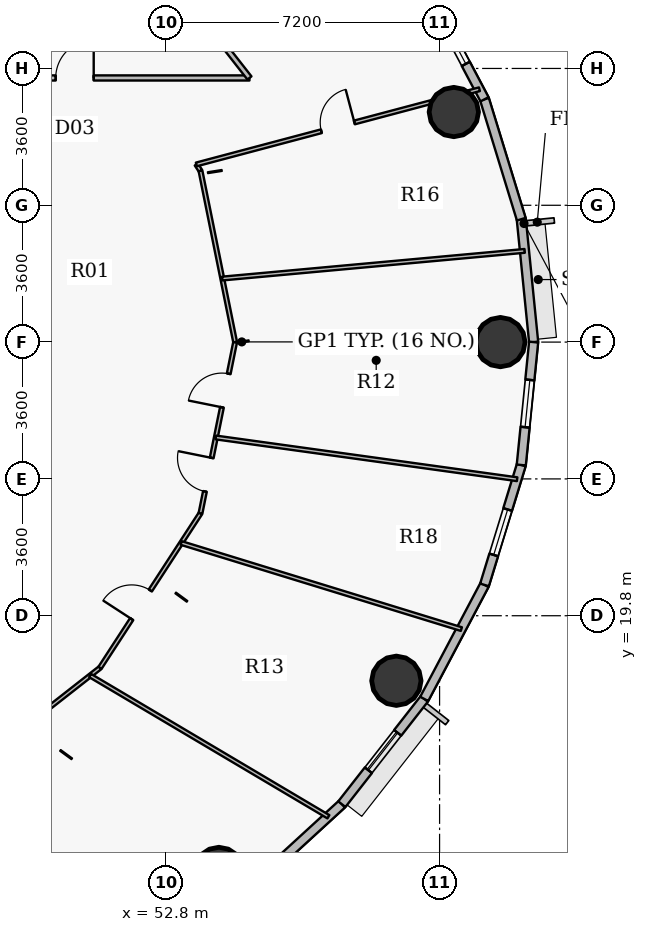
"""IFC4 building model, lengths in metres.
Left out: names, types, materials, properties, quantities, classifications, styles, units other than length and angle.
Written with IfcOpenShell. Run it as: python <this file> out.ifc"""

import sys

from ifc_helpers import new_model, si_unit, direction, frame, frame_2d, origin, origin_2d, place, context, subcontext, project, spatial, rectangle, hollow_circle, extrude, source, transform, mapped, element, fill, save


model = new_model("IFC4")
c1 = context("Model", 3, precision=1e-05, world=origin(), true_north=direction((0.0, 1.0)))
c2 = subcontext(c1, "Body", "Model", "MODEL_VIEW")
j1 = project(units=[si_unit("LENGTHUNIT", "METRE"), si_unit("PLANEANGLEUNIT", "RADIAN")], contexts=[c1])
p1 = place(None, origin())
s1 = spatial("IfcSite", under=j1, at=p1, CompositionType="ELEMENT")
p2 = place(p1, origin())
s2 = spatial("IfcBuilding", under=s1, at=p2, CompositionType="ELEMENT")
p3 = place(p2, frame((0.0, 0.0, 189.9)))
s3 = spatial("IfcBuildingStorey", under=s2, at=p3, CompositionType="ELEMENT", Elevation=189.9)
for number, where, z_axis, x_axis in (
    (1, (61.6, 27.0, 0.0), (0.0, 0.0, 1.0), (1.0, 0.0, 0.0)),
    (2, (60.375, 33.053, 0.0), (0.0, 0.0, 1.0), (1.0, 0.0, 0.0)),
    (3, (54.192, 13.058, 0.0), (0.0, 0.0, 1.0), (1.0, 0.0, 0.0)),
    (4, (58.863, 18.089, 0.0), (0.0, 0.0, 1.0), (1.0, 0.0, 0.0)),
):
    element("IfcColumn", number, at=place(p3, frame(where, z_axis=z_axis, x_axis=x_axis)), inside=s3, PredefinedType="COLUMN", context=c2, shape_type="SweptSolid", body=[
        extrude(hollow_circle(Radius=0.65, WallThickness=0.04, at=origin_2d()), origin(), (0.0, 0.0, 1.0), 3.75),
    ])
p4 = place(p3, frame((62.15, 30.234, 0.0), z_axis=(0.0, 0.0, 1.0), x_axis=(0.100061534614, -0.994981250723, 0.0)))
e5 = element("IfcWall", 5, at=p4, inside=s3, PredefinedType="SOLIDWALL", context=c2, shape_type="SweptSolid", body=[
    extrude(rectangle(XDim=3.25, YDim=0.24, at=frame_2d((1.625, 0.0))), origin(), (0.0, 0.0, 1.0), 3.5),
])
p5 = place(p3, frame((61.183, 33.389, 0.0), z_axis=(0.0, 0.0, 1.0), x_axis=(0.293097995113, -0.956082405058, 0.0)))
e6 = element("IfcWall", 6, at=p5, inside=s3, PredefinedType="SOLIDWALL", context=c2, shape_type="SweptSolid", body=[
    extrude(rectangle(XDim=3.3, YDim=0.24, at=frame_2d((1.65, 0.0))), origin(), (0.0, 0.0, 1.0), 3.5),
])
p6 = place(p3, frame((59.596, 36.388, 0.0), z_axis=(0.0, 0.0, 1.0), x_axis=(0.467586874938, -0.88394712194, 0.0)))
e7 = element("IfcWall", 7, at=p6, inside=s3, PredefinedType="SOLIDWALL", context=c2, shape_type="SweptSolid", body=[
    extrude(rectangle(XDim=3.393, YDim=0.24, at=frame_2d((1.697, 0.0))), origin(), (0.0, 0.0, 1.0), 3.5),
])
p7 = place(p6, frame((0.739, 0.0, 0.9)))
e8 = element("IfcOpeningElement", 8, at=p7, cuts=e7, PredefinedType="OPENING", context=c2, shape_type="SweptSolid", body=[
    extrude(rectangle(XDim=1.6, YDim=1.75, at=origin_2d()), frame((0.8, 0.13, 0.875), z_axis=(0.0, -1.0, 0.0), x_axis=(1.0, 0.0, 0.0)), (0.0, 0.0, 1.0), 0.26),
])
p8 = place(p3, frame((57.428, 14.842, 0.0), z_axis=(0.0, 0.0, 1.0), x_axis=(-0.737076565834, -0.675809245349, 0.0)))
e9 = element("IfcWall", 9, at=p8, inside=s3, PredefinedType="SOLIDWALL", context=c2, shape_type="SweptSolid", body=[
    extrude(rectangle(XDim=3.658, YDim=0.24, at=frame_2d((1.829, 0.0))), origin(), (0.0, 0.0, 1.0), 3.5),
])
p9 = place(p3, frame((59.596, 17.612, 0.0), z_axis=(0.0, 0.0, 1.0), x_axis=(-0.616287674549, -0.787521112224, 0.0)))
e10 = element("IfcWall", 10, at=p9, inside=s3, PredefinedType="SOLIDWALL", context=c2, shape_type="SweptSolid", body=[
    extrude(rectangle(XDim=3.517, YDim=0.24, at=frame_2d((1.759, 0.0))), origin(), (0.0, 0.0, 1.0), 3.5),
])
p10 = place(p9, frame((1.134, 0.0, 0.9)))
e11 = element("IfcOpeningElement", 11, at=p10, cuts=e10, PredefinedType="OPENING", context=c2, shape_type="SweptSolid", body=[
    extrude(rectangle(XDim=1.25, YDim=1.65, at=origin_2d()), frame((0.625, 0.13, 0.825), z_axis=(0.0, -1.0, 0.0), x_axis=(1.0, 0.0, 0.0)), (0.0, 0.0, 1.0), 0.26),
])
p11 = place(p3, frame((61.183, 20.611, 0.0), z_axis=(0.0, 0.0, 1.0), x_axis=(-0.467586874938, -0.88394712194, 0.0)))
e12 = element("IfcWall", 12, at=p11, inside=s3, PredefinedType="SOLIDWALL", context=c2, shape_type="SweptSolid", body=[
    extrude(rectangle(XDim=3.393, YDim=0.24, at=frame_2d((1.697, 0.0))), origin(), (0.0, 0.0, 1.0), 3.5),
])
p12 = place(p3, frame((62.15, 23.766, 0.0), z_axis=(0.0, 0.0, 1.0), x_axis=(-0.293097995113, -0.956082405058, 0.0)))
e13 = element("IfcWall", 13, at=p12, inside=s3, PredefinedType="SOLIDWALL", context=c2, shape_type="SweptSolid", body=[
    extrude(rectangle(XDim=3.3, YDim=0.24, at=frame_2d((1.65, 0.0))), origin(), (0.0, 0.0, 1.0), 3.5),
])
p13 = place(p12, frame((1.225, 0.0, 0.9)))
e14 = element("IfcOpeningElement", 14, at=p13, cuts=e13, PredefinedType="OPENING", context=c2, shape_type="SweptSolid", body=[
    extrude(rectangle(XDim=1.25, YDim=1.65, at=origin_2d()), frame((0.625, 0.13, 0.825), z_axis=(0.0, -1.0, 0.0), x_axis=(1.0, 0.0, 0.0)), (0.0, 0.0, 1.0), 0.26),
])
p14 = place(p3, frame((62.475, 27.0, 0.0), z_axis=(0.0, 0.0, 1.0), x_axis=(-0.100061534614, -0.994981250723, 0.0)))
e15 = element("IfcWall", 15, at=p14, inside=s3, PredefinedType="SOLIDWALL", context=c2, shape_type="SweptSolid", body=[
    extrude(rectangle(XDim=3.25, YDim=0.24, at=frame_2d((1.625, 0.0))), origin(), (0.0, 0.0, 1.0), 3.5),
])
p15 = place(p14, frame((1.0, 0.0, 0.9)))
e16 = element("IfcOpeningElement", 16, at=p15, cuts=e15, PredefinedType="OPENING", context=c2, shape_type="SweptSolid", body=[
    extrude(rectangle(XDim=1.25, YDim=1.65, at=origin_2d()), frame((0.625, 0.13, 0.825), z_axis=(0.0, -1.0, 0.0), x_axis=(1.0, 0.0, 0.0)), (0.0, 0.0, 1.0), 0.26),
])
p16 = place(p3, frame((45.8, 33.95, 0.0), z_axis=(0.0, 0.0, 1.0), x_axis=(1.0, 0.0, 0.0)))
e17 = element("IfcWall", 17, at=p16, inside=s3, PredefinedType="PARTITIONING", context=c2, shape_type="SweptSolid", body=[
    extrude(rectangle(XDim=9.197, YDim=0.135, at=frame_2d((4.599, 0.0))), origin(), (0.0, 0.0, 1.0), 3.5),
])
p17 = place(p16, frame((4.098, 0.0, 0.0)))
e18 = element("IfcOpeningElement", 18, at=p17, cuts=e17, PredefinedType="OPENING", context=c2, shape_type="SweptSolid", body=[
    extrude(rectangle(XDim=1.0, YDim=2.15, at=origin_2d()), frame((0.5, 0.078, 1.075), z_axis=(0.0, -1.0, 0.0), x_axis=(1.0, 0.0, 0.0)), (0.0, 0.0, 1.0), 0.155),
])
p18 = place(p3, frame((46.945, 15.204, 0.0), z_axis=(0.0, 0.0, 1.0), x_axis=(0.787322805473, 0.61654099619, 0.0)))
e19 = element("IfcWall", 19, at=p18, inside=s3, PredefinedType="PARTITIONING", context=c2, shape_type="SweptSolid", body=[
    extrude(rectangle(XDim=5.232, YDim=0.1, at=frame_2d((2.616, 0.0))), origin(), (0.0, 0.0, 1.0), 2.935),
])
p19 = place(p18, frame((2.021, 0.0, 0.0)))
e20 = element("IfcOpeningElement", 20, at=p19, cuts=e19, PredefinedType="OPENING", context=c2, shape_type="SweptSolid", body=[
    extrude(rectangle(XDim=0.9, YDim=2.1, at=origin_2d()), frame((0.45, 0.06, 1.05), z_axis=(0.0, -1.0, 0.0), x_axis=(1.0, 0.0, 0.0)), (0.0, 0.0, 1.0), 0.12),
])
p20 = place(p3, frame((50.804, 18.226, 0.0), z_axis=(0.0, 0.0, 1.0), x_axis=(0.860276297954, -0.509828099636, 0.0)))
e21 = element("IfcWall", 21, at=p20, inside=s3, PredefinedType="PARTITIONING", context=c2, shape_type="SweptSolid", body=[
    extrude(rectangle(XDim=7.288, YDim=0.1, at=frame_2d((3.644, 0.0))), origin(), (0.0, 0.0, 1.0), 2.935),
])
p21 = place(p3, frame((51.064, 18.429, 0.0), z_axis=(0.0, 0.0, 1.0), x_axis=(0.545382906853, 0.838187022634, 0.0)))
e22 = element("IfcWall", 22, at=p21, inside=s3, PredefinedType="PARTITIONING", context=c2, shape_type="SweptSolid", body=[
    extrude(rectangle(XDim=4.849, YDim=0.1, at=frame_2d((2.425, 0.0))), origin(), (0.0, 0.0, 1.0), 2.935),
])
p22 = place(p21, frame((1.529, 0.0, 0.0)))
e23 = element("IfcOpeningElement", 23, at=p22, cuts=e22, PredefinedType="OPENING", context=c2, shape_type="SweptSolid", body=[
    extrude(rectangle(XDim=0.9, YDim=2.1, at=origin_2d()), frame((0.45, 0.06, 1.05), z_axis=(0.0, -1.0, 0.0), x_axis=(1.0, 0.0, 0.0)), (0.0, 0.0, 1.0), 0.12),
])
p23 = place(p3, frame((53.201, 21.714, 0.0), z_axis=(0.0, 0.0, 1.0), x_axis=(0.955880247412, -0.293756621386, 0.0)))
e24 = element("IfcWall", 24, at=p23, inside=s3, PredefinedType="PARTITIONING", context=c2, shape_type="SweptSolid", body=[
    extrude(rectangle(XDim=7.713, YDim=0.1, at=frame_2d((3.856, 0.0))), origin(), (0.0, 0.0, 1.0), 2.935),
])
p24 = place(p3, frame((53.599, 31.674, 0.0), z_axis=(0.0, 0.0, 1.0), x_axis=(0.545415251213, -0.838165976251, 0.0)))
e25 = element("IfcWall", 25, at=p24, inside=s3, PredefinedType="PARTITIONING", context=c2, shape_type="SweptSolid", body=[
    extrude(rectangle(XDim=0.201, YDim=0.1, at=frame_2d((0.101, 0.0))), origin(), (0.0, 0.0, 1.0), 2.935),
])
p25 = place(p3, frame((53.599, 31.674, 0.0), z_axis=(0.0, 0.0, 1.0), x_axis=(0.966493108364, 0.256692562193, 0.0)))
e26 = element("IfcWall", 26, at=p25, inside=s3, PredefinedType="PARTITIONING", context=c2, shape_type="SweptSolid", body=[
    extrude(rectangle(XDim=7.708, YDim=0.1, at=frame_2d((3.854, 0.0))), origin(), (0.0, 0.0, 1.0), 2.935),
])
p26 = place(p25, frame((3.404, 0.0, 0.0)))
e27 = element("IfcOpeningElement", 27, at=p26, cuts=e26, PredefinedType="OPENING", context=c2, shape_type="SweptSolid", body=[
    extrude(rectangle(XDim=0.9, YDim=2.1, at=origin_2d()), frame((0.45, 0.06, 1.05), z_axis=(0.0, -1.0, 0.0), x_axis=(1.0, 0.0, 0.0)), (0.0, 0.0, 1.0), 0.12),
])
p27 = place(p3, frame((53.653, 35.667, 0.0), z_axis=(0.0, 0.0, 1.0), x_axis=(0.616302223209, -0.787509726713, 0.0)))
e28 = element("IfcWall", 28, at=p27, inside=s3, PredefinedType="PARTITIONING", context=c2, shape_type="SweptSolid", body=[
    extrude(rectangle(XDim=2.18, YDim=0.135, at=frame_2d((1.09, 0.0))), origin(), (0.0, 0.0, 1.0), 3.5),
])
p28 = place(p3, frame((53.709, 22.494, 0.0), z_axis=(0.0, 0.0, 1.0), x_axis=(0.19825018224, 0.980151450155, 0.0)))
e29 = element("IfcWall", 29, at=p28, inside=s3, PredefinedType="PARTITIONING", context=c2, shape_type="SweptSolid", body=[
    extrude(rectangle(XDim=4.597, YDim=0.1, at=frame_2d((2.299, 0.0))), origin(), (0.0, 0.0, 1.0), 2.935),
])
p29 = place(p28, frame((0.588, 0.0, 0.0)))
e30 = element("IfcOpeningElement", 30, at=p29, cuts=e29, PredefinedType="OPENING", context=c2, shape_type="SweptSolid", body=[
    extrude(rectangle(XDim=0.9, YDim=2.1, at=origin_2d()), frame((0.45, 0.06, 1.05), z_axis=(0.0, -1.0, 0.0), x_axis=(1.0, 0.0, 0.0)), (0.0, 0.0, 1.0), 0.12),
])
p30 = place(p28, frame((2.847, 0.0, 0.0)))
e31 = element("IfcOpeningElement", 31, at=p30, cuts=e29, PredefinedType="OPENING", context=c2, shape_type="SweptSolid", body=[
    extrude(rectangle(XDim=0.9, YDim=2.1, at=origin_2d()), frame((0.45, 0.06, 1.05), z_axis=(0.0, -1.0, 0.0), x_axis=(1.0, 0.0, 0.0)), (0.0, 0.0, 1.0), 0.12),
])
p31 = place(p3, frame((53.709, 31.506, 0.0), z_axis=(0.0, 0.0, 1.0), x_axis=(0.198209478932, -0.980159682124, 0.0)))
e32 = element("IfcWall", 32, at=p31, inside=s3, PredefinedType="PARTITIONING", context=c2, shape_type="SweptSolid", body=[
    extrude(rectangle(XDim=4.597, YDim=0.1, at=frame_2d((2.298, 0.0))), origin(), (0.0, 0.0, 1.0), 2.935),
])
p32 = place(p3, frame((54.112, 24.49, 0.0), z_axis=(0.0, 0.0, 1.0), x_axis=(0.990538514902, -0.137235019202, 0.0)))
e33 = element("IfcWall", 33, at=p32, inside=s3, PredefinedType="PARTITIONING", context=c2, shape_type="SweptSolid", body=[
    extrude(rectangle(XDim=8.004, YDim=0.1, at=frame_2d((4.002, 0.0))), origin(), (0.0, 0.0, 1.0), 2.935),
])
p33 = place(p3, frame((54.282, 28.672, 0.0), z_axis=(0.0, 0.0, 1.0), x_axis=(0.995843216122, 0.091083966227, 0.0)))
e34 = element("IfcWall", 34, at=p33, inside=s3, PredefinedType="PARTITIONING", context=c2, shape_type="SweptSolid", body=[
    extrude(rectangle(XDim=7.99, YDim=0.1, at=frame_2d((3.995, 0.0))), origin(), (0.0, 0.0, 1.0), 2.935),
])
m1 = source(origin(), c2, "Body", "SweptSolid", [
    extrude(rectangle(XDim=1.6, YDim=1.75, at=origin_2d()), frame((0.8, 0.03, 0.875), z_axis=(0.0, -1.0, 0.0), x_axis=(1.0, 0.0, 0.0)), (0.0, 0.0, 1.0), 0.06),
])
p34 = place(p7, origin())
e35 = element("IfcWindow", 35, at=p34, inside=s3, PartitioningType="DOUBLE_PANEL_VERTICAL", PredefinedType="WINDOW", context=c2, shape_type="MappedRepresentation", body=[
    mapped(m1, transform((0.0, 0.0, 0.0), x_axis=(1.0, 0.0, 0.0), y_axis=(0.0, 1.0, 0.0), z_axis=(0.0, 0.0, 1.0), scale=1.0)),
])
fill(e8, e35)
m2 = source(origin(), c2, "Body", "SweptSolid", [
    extrude(rectangle(XDim=1.25, YDim=1.65, at=origin_2d()), frame((0.625, 0.03, 0.825), z_axis=(0.0, -1.0, 0.0), x_axis=(1.0, 0.0, 0.0)), (0.0, 0.0, 1.0), 0.06),
])
p35 = place(p13, origin())
e36 = element("IfcWindow", 36, at=p35, inside=s3, PartitioningType="SINGLE_PANEL", PredefinedType="WINDOW", context=c2, shape_type="MappedRepresentation", body=[
    mapped(m2, transform((0.0, 0.0, 0.0), x_axis=(1.0, 0.0, 0.0), y_axis=(0.0, 1.0, 0.0), z_axis=(0.0, 0.0, 1.0), scale=1.0)),
])
fill(e14, e36)
p36 = place(p10, origin())
e37 = element("IfcWindow", 37, at=p36, inside=s3, PartitioningType="SINGLE_PANEL", PredefinedType="WINDOW", context=c2, shape_type="MappedRepresentation", body=[
    mapped(m2, transform((0.0, 0.0, 0.0), x_axis=(1.0, 0.0, 0.0), y_axis=(0.0, 1.0, 0.0), z_axis=(0.0, 0.0, 1.0), scale=1.0)),
])
fill(e11, e37)
p37 = place(p15, origin())
e38 = element("IfcWindow", 38, at=p37, inside=s3, PartitioningType="SINGLE_PANEL", PredefinedType="WINDOW", context=c2, shape_type="MappedRepresentation", body=[
    mapped(m2, transform((0.0, 0.0, 0.0), x_axis=(1.0, 0.0, 0.0), y_axis=(0.0, 1.0, 0.0), z_axis=(0.0, 0.0, 1.0), scale=1.0)),
])
fill(e16, e38)
m3 = source(origin(), c2, "Body", "SweptSolid", [
    extrude(rectangle(XDim=1.0, YDim=2.15, at=origin_2d()), frame((0.5, 0.025, 1.075), z_axis=(0.0, -1.0, 0.0), x_axis=(1.0, 0.0, 0.0)), (0.0, 0.0, 1.0), 0.05),
])
p38 = place(p17, origin())
e39 = element("IfcDoor", 39, at=p38, inside=s3, OperationType="SINGLE_SWING_RIGHT", PredefinedType="DOOR", context=c2, shape_type="MappedRepresentation", body=[
    mapped(m3, transform((0.0, 0.0, 0.0), x_axis=(1.0, 0.0, 0.0), y_axis=(0.0, 1.0, 0.0), z_axis=(0.0, 0.0, 1.0), scale=1.0)),
])
fill(e18, e39)
m4 = source(origin(), c2, "Body", "SweptSolid", [
    extrude(rectangle(XDim=0.9, YDim=2.1, at=origin_2d()), frame((0.45, 0.025, 1.05), z_axis=(0.0, -1.0, 0.0), x_axis=(1.0, 0.0, 0.0)), (0.0, 0.0, 1.0), 0.05),
])
p39 = place(p22, origin())
e40 = element("IfcDoor", 40, at=p39, inside=s3, OperationType="SINGLE_SWING_LEFT", PredefinedType="DOOR", context=c2, shape_type="MappedRepresentation", body=[
    mapped(m4, transform((0.0, 0.0, 0.0), x_axis=(1.0, 0.0, 0.0), y_axis=(0.0, 1.0, 0.0), z_axis=(0.0, 0.0, 1.0), scale=1.0)),
])
fill(e23, e40)
p40 = place(p29, origin())
e41 = element("IfcDoor", 41, at=p40, inside=s3, OperationType="SINGLE_SWING_RIGHT", PredefinedType="DOOR", context=c2, shape_type="MappedRepresentation", body=[
    mapped(m4, transform((0.0, 0.0, 0.0), x_axis=(1.0, 0.0, 0.0), y_axis=(0.0, 1.0, 0.0), z_axis=(0.0, 0.0, 1.0), scale=1.0)),
])
fill(e30, e41)
p41 = place(p30, origin())
e42 = element("IfcDoor", 42, at=p41, inside=s3, OperationType="SINGLE_SWING_LEFT", PredefinedType="DOOR", context=c2, shape_type="MappedRepresentation", body=[
    mapped(m4, transform((0.0, 0.0, 0.0), x_axis=(1.0, 0.0, 0.0), y_axis=(0.0, 1.0, 0.0), z_axis=(0.0, 0.0, 1.0), scale=1.0)),
])
fill(e31, e42)
p42 = place(p26, origin())
e43 = element("IfcDoor", 43, at=p42, inside=s3, OperationType="SINGLE_SWING_RIGHT", PredefinedType="DOOR", context=c2, shape_type="MappedRepresentation", body=[
    mapped(m4, transform((0.0, 0.0, 0.0), x_axis=(1.0, 0.0, 0.0), y_axis=(0.0, 1.0, 0.0), z_axis=(0.0, 0.0, 1.0), scale=1.0)),
])
fill(e27, e43)
save(model, sys.argv[1])
